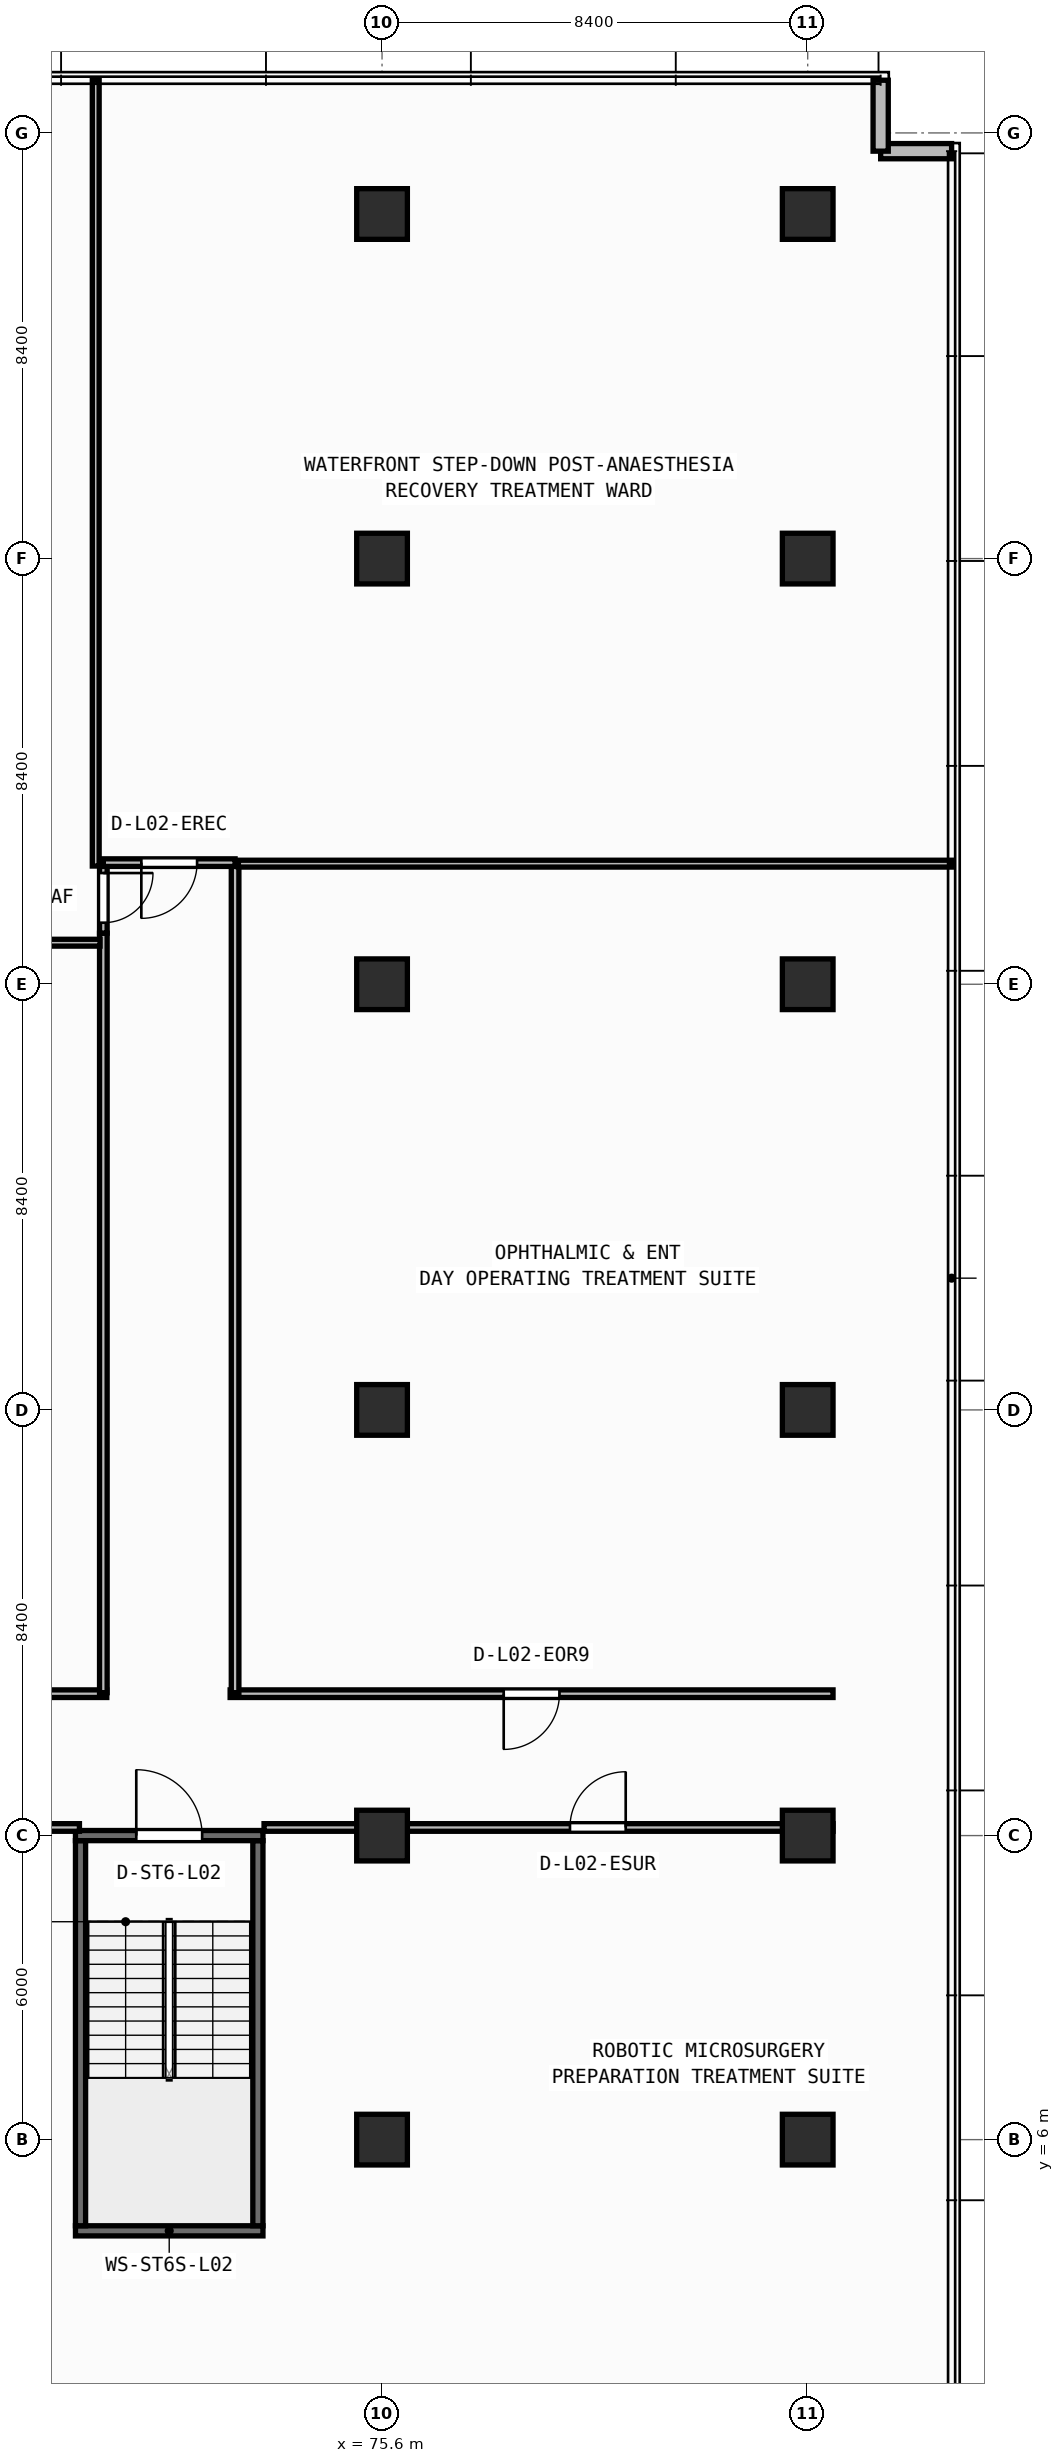
"""IFC4 building model, lengths in metres.
Left out: names, types, materials, properties, quantities, classifications, styles, units other than length and angle.
Written with IfcOpenShell. Run it as: python <this file> out.ifc"""

import sys

from ifc_helpers import new_model, si_unit, direction, frame, frame_2d, origin, origin_2d, place, context, subcontext, project, spatial, rectangle, circle, extrude, element, fill, save


model = new_model("IFC4")
c1 = context("Model", 3, precision=1e-05, world=origin(), true_north=direction((0.0, 1.0)))
c2 = subcontext(c1, "Body", "Model", "MODEL_VIEW")
j1 = project(units=[si_unit("LENGTHUNIT", "METRE"), si_unit("PLANEANGLEUNIT", "RADIAN")], contexts=[c1])
p1 = place(None, origin())
s1 = spatial("IfcSite", under=j1, at=p1, CompositionType="ELEMENT")
p2 = place(p1, origin())
s2 = spatial("IfcBuilding", under=s1, at=p2, CompositionType="ELEMENT")
p3 = place(p2, frame((0.0, 0.0, 9.0)))
s3 = spatial("IfcBuildingStorey", under=s2, at=p3, CompositionType="ELEMENT", Elevation=9.0)
for number, where, z_axis, x_axis in (
    (1, (75.6, 6.0, 0.0), (0.0, 0.0, 1.0), (1.0, 0.0, 0.0)),
    (2, (84.0, 6.0, 0.0), (0.0, 0.0, 1.0), (1.0, 0.0, 0.0)),
    (3, (75.6, 12.0, 0.0), (0.0, 0.0, 1.0), (1.0, 0.0, 0.0)),
    (4, (84.0, 12.0, 0.0), (0.0, 0.0, 1.0), (1.0, 0.0, 0.0)),
    (5, (75.6, 20.4, 0.0), (0.0, 0.0, 1.0), (1.0, 0.0, 0.0)),
    (6, (84.0, 20.4, 0.0), (0.0, 0.0, 1.0), (1.0, 0.0, 0.0)),
    (7, (75.6, 28.8, 0.0), (0.0, 0.0, 1.0), (1.0, 0.0, 0.0)),
    (8, (84.0, 28.8, 0.0), (0.0, 0.0, 1.0), (1.0, 0.0, 0.0)),
    (9, (75.6, 37.2, 0.0), (0.0, 0.0, 1.0), (1.0, 0.0, 0.0)),
    (10, (84.0, 37.2, 0.0), (0.0, 0.0, 1.0), (1.0, 0.0, 0.0)),
    (11, (75.6, 44.0, 0.0), (0.0, 0.0, 1.0), (1.0, 0.0, 0.0)),
    (12, (84.0, 44.0, 0.0), (0.0, 0.0, 1.0), (1.0, 0.0, 0.0)),
):
    element("IfcColumn", number, at=place(p3, frame(where, z_axis=z_axis, x_axis=x_axis)), inside=s3, PredefinedType="COLUMN", context=c2, shape_type="SweptSolid", body=[
        extrude(circle(Radius=0.5, at=origin_2d()), origin(), (0.0, 0.0, 1.0), 4.5),
    ])
p4 = place(p3, frame((86.84, 45.24, 0.0), z_axis=(0.0, 0.0, 1.0), x_axis=(-1.0, 0.0, 0.0)))
e13 = element("IfcWall", 13, at=p4, inside=s3, PredefinedType="STANDARD", context=c2, shape_type="SweptSolid", body=[
    extrude(rectangle(XDim=1.4, YDim=0.3, at=frame_2d((0.7, 0.0))), origin(), (0.0, 0.0, 1.0), 4.25),
])
p5 = place(p3, frame((85.44, 45.24, 0.0), z_axis=(0.0, 0.0, 1.0), x_axis=(0.0, 1.0, 0.0)))
e14 = element("IfcWall", 14, at=p5, inside=s3, PredefinedType="STANDARD", context=c2, shape_type="SweptSolid", body=[
    extrude(rectangle(XDim=1.4, YDim=0.3, at=frame_2d((0.7, 0.0))), origin(), (0.0, 0.0, 1.0), 4.25),
])
p6 = place(p3, frame((69.55, 4.2, 0.0), z_axis=(0.0, 0.0, 1.0), x_axis=(1.0, 0.0, 0.0)))
e15 = element("IfcWall", 15, at=p6, inside=s3, PredefinedType="SHEAR", context=c2, shape_type="SweptSolid", body=[
    extrude(rectangle(XDim=3.7, YDim=0.2, at=frame_2d((1.85, 0.0))), origin(), (0.0, 0.0, 1.0), 4.25),
])
for number, where, z_axis, x_axis in (
    (16, (69.65, 4.3, 0.0), (0.0, 0.0, 1.0), (0.0, 1.0, 0.0)),
    (17, (73.15, 4.3, 0.0), (0.0, 0.0, 1.0), (0.0, 1.0, 0.0)),
):
    element("IfcWall", number, at=place(p3, frame(where, z_axis=z_axis, x_axis=x_axis)), inside=s3, PredefinedType="SHEAR", context=c2, shape_type="SweptSolid", body=[
        extrude(rectangle(XDim=7.6, YDim=0.2, at=frame_2d((3.8, 0.0))), origin(), (0.0, 0.0, 1.0), 4.25),
    ])
p7 = place(p3, frame((69.55, 12.0, 0.0), z_axis=(0.0, 0.0, 1.0), x_axis=(1.0, 0.0, 0.0)))
e18 = element("IfcWall", 18, at=p7, inside=s3, PredefinedType="SHEAR", context=c2, shape_type="SweptSolid", body=[
    extrude(rectangle(XDim=3.7, YDim=0.2, at=frame_2d((1.85, 0.0))), origin(), (0.0, 0.0, 1.0), 4.25),
])
p8 = place(p7, frame((1.2, 0.0, 0.0)))
e19 = element("IfcOpeningElement", 19, at=p8, cuts=e18, PredefinedType="OPENING", context=c2, shape_type="SweptSolid", body=[
    extrude(rectangle(XDim=1.3, YDim=2.15, at=frame_2d((0.65, 1.075))), frame((0.0, 0.11, 0.0), z_axis=(0.0, -1.0, 0.0), x_axis=(1.0, 0.0, 0.0)), (0.0, 0.0, 1.0), 0.22),
])
p9 = place(p3, frame((49.622, 12.16, 0.0), z_axis=(0.0, 0.0, 1.0), x_axis=(1.0, 0.0, 0.0)))
e20 = element("IfcWall", 20, at=p9, inside=s3, PredefinedType="PARTITIONING", context=c2, shape_type="SweptSolid", body=[
    extrude(rectangle(XDim=20.007, YDim=0.15, at=frame_2d((10.003, 0.0))), origin(), (0.0, 0.0, 1.0), 3.425),
])
p10 = place(p9, frame((4.364, 0.0, 0.0)))
e21 = element("IfcOpeningElement", 21, at=p10, cuts=e20, PredefinedType="OPENING", context=c2, shape_type="SweptSolid", body=[
    extrude(rectangle(XDim=1.1, YDim=2.1, at=frame_2d((0.55, 1.05))), frame((0.0, 0.085, 0.0), z_axis=(0.0, -1.0, 0.0), x_axis=(1.0, 0.0, 0.0)), (0.0, 0.0, 1.0), 0.17),
])
p11 = place(p3, frame((73.271, 12.16, 0.0), z_axis=(0.0, 0.0, 1.0), x_axis=(1.0, 0.0, 0.0)))
e22 = element("IfcWall", 22, at=p11, inside=s3, PredefinedType="PARTITIONING", context=c2, shape_type="SweptSolid", body=[
    extrude(rectangle(XDim=11.229, YDim=0.15, at=frame_2d((5.614, 0.0))), origin(), (0.0, 0.0, 1.0), 3.425),
])
p12 = place(p11, frame((6.037, 0.0, 0.0)))
e23 = element("IfcOpeningElement", 23, at=p12, cuts=e22, PredefinedType="OPENING", context=c2, shape_type="SweptSolid", body=[
    extrude(rectangle(XDim=1.1, YDim=2.1, at=frame_2d((0.55, 1.05))), frame((0.0, 0.085, 0.0), z_axis=(0.0, -1.0, 0.0), x_axis=(1.0, 0.0, 0.0)), (0.0, 0.0, 1.0), 0.17),
])
p13 = place(p3, frame((70.168, 14.8, 0.0), z_axis=(0.0, 0.0, 1.0), x_axis=(-1.0, 0.0, 0.0)))
e24 = element("IfcWall", 24, at=p13, inside=s3, PredefinedType="PARTITIONING", context=c2, shape_type="SweptSolid", body=[
    extrude(rectangle(XDim=25.948, YDim=0.15, at=frame_2d((12.974, 0.0))), origin(), (0.0, 0.0, 1.0), 4.25),
])
p14 = place(p13, frame((12.424, 0.0, 0.0)))
e25 = element("IfcOpeningElement", 25, at=p14, cuts=e24, PredefinedType="OPENING", context=c2, shape_type="SweptSolid", body=[
    extrude(rectangle(XDim=1.1, YDim=2.1, at=frame_2d((0.55, 1.05))), frame((0.0, 0.085, 0.0), z_axis=(0.0, -1.0, 0.0), x_axis=(1.0, 0.0, 0.0)), (0.0, 0.0, 1.0), 0.17),
])
p15 = place(p3, frame((84.5, 14.8, 0.0), z_axis=(0.0, 0.0, 1.0), x_axis=(-1.0, 0.0, 0.0)))
e26 = element("IfcWall", 26, at=p15, inside=s3, PredefinedType="PARTITIONING", context=c2, shape_type="SweptSolid", body=[
    extrude(rectangle(XDim=11.898, YDim=0.15, at=frame_2d((5.949, 0.0))), origin(), (0.0, 0.0, 1.0), 4.25),
])
p16 = place(p15, frame((5.399, 0.0, 0.0)))
e27 = element("IfcOpeningElement", 27, at=p16, cuts=e26, PredefinedType="OPENING", context=c2, shape_type="SweptSolid", body=[
    extrude(rectangle(XDim=1.1, YDim=2.1, at=frame_2d((0.55, 1.05))), frame((0.0, 0.085, 0.0), z_axis=(0.0, -1.0, 0.0), x_axis=(1.0, 0.0, 0.0)), (0.0, 0.0, 1.0), 0.17),
])
p17 = place(p3, frame((70.1, 29.807, 0.0), z_axis=(0.0, 0.0, 1.0), x_axis=(0.0, -1.0, 0.0)))
e28 = element("IfcWall", 28, at=p17, inside=s3, PredefinedType="PARTITIONING", context=c2, shape_type="SweptSolid", body=[
    extrude(rectangle(XDim=14.987, YDim=0.15, at=frame_2d((7.494, 0.0))), origin(), (0.0, 0.0, 1.0), 4.25),
])
p18 = place(p3, frame((72.7, 14.82, 0.0), z_axis=(0.0, 0.0, 1.0), x_axis=(0.0, 1.0, 0.0)))
e29 = element("IfcWall", 29, at=p18, inside=s3, PredefinedType="PARTITIONING", context=c2, shape_type="SweptSolid", body=[
    extrude(rectangle(XDim=16.38, YDim=0.15, at=frame_2d((8.19, 0.0))), origin(), (0.0, 0.0, 1.0), 4.25),
])
p19 = place(p3, frame((70.1, 31.2, 0.0), z_axis=(0.0, 0.0, 1.0), x_axis=(0.0, -1.0, 0.0)))
e30 = element("IfcWall", 30, at=p19, inside=s3, PredefinedType="PARTITIONING", context=c2, shape_type="SweptSolid", body=[
    extrude(rectangle(XDim=1.391, YDim=0.15, at=frame_2d((0.695, 0.0))), origin(), (0.0, 0.0, 1.0), 4.25),
])
p20 = place(p19, frame((0.205, 0.0, 0.0)))
e31 = element("IfcOpeningElement", 31, at=p20, cuts=e30, PredefinedType="OPENING", context=c2, shape_type="SweptSolid", body=[
    extrude(rectangle(XDim=0.98, YDim=2.1, at=frame_2d((0.49, 1.05))), frame((0.0, 0.085, 0.0), z_axis=(0.0, -1.0, 0.0), x_axis=(1.0, 0.0, 0.0)), (0.0, 0.0, 1.0), 0.17),
])
p21 = place(p3, frame((72.7, 31.2, 0.0), z_axis=(0.0, 0.0, 1.0), x_axis=(-1.0, 0.0, 0.0)))
e32 = element("IfcWall", 32, at=p21, inside=s3, PredefinedType="PARTITIONING", context=c2, shape_type="SweptSolid", body=[
    extrude(rectangle(XDim=2.6, YDim=0.15, at=frame_2d((1.3, 0.0))), origin(), (0.0, 0.0, 1.0), 4.25),
])
p22 = place(p21, frame((0.75, 0.0, 0.0)))
e33 = element("IfcOpeningElement", 33, at=p22, cuts=e32, PredefinedType="OPENING", context=c2, shape_type="SweptSolid", body=[
    extrude(rectangle(XDim=1.1, YDim=2.1, at=frame_2d((0.55, 1.05))), frame((0.0, 0.085, 0.0), z_axis=(0.0, -1.0, 0.0), x_axis=(1.0, 0.0, 0.0)), (0.0, 0.0, 1.0), 0.17),
])
p23 = place(p3, frame((70.035, 29.62, 0.0), z_axis=(0.0, 0.0, 1.0), x_axis=(-1.0, 0.0, 0.0)))
e34 = element("IfcWall", 34, at=p23, inside=s3, PredefinedType="PARTITIONING", context=c2, shape_type="SweptSolid", body=[
    extrude(rectangle(XDim=25.977, YDim=0.135, at=frame_2d((12.989, 0.0))), origin(), (0.0, 0.0, 1.0), 4.25),
])
p24 = place(p3, frame((86.84, 31.18, 0.0), z_axis=(0.0, 0.0, 1.0), x_axis=(-1.0, 0.0, 0.0)))
e35 = element("IfcWall", 35, at=p24, inside=s3, PredefinedType="PARTITIONING", context=c2, shape_type="SweptSolid", body=[
    extrude(rectangle(XDim=14.075, YDim=0.135, at=frame_2d((7.038, 0.0))), origin(), (0.0, 0.0, 1.0), 4.25),
])
p25 = place(p3, frame((69.95, 31.133, 0.0), z_axis=(0.0, 0.0, 1.0), x_axis=(0.0, 1.0, 0.0)))
e36 = element("IfcWall", 36, at=p25, inside=s3, PredefinedType="PARTITIONING", context=c2, shape_type="SweptSolid", body=[
    extrude(rectangle(XDim=15.507, YDim=0.135, at=frame_2d((7.753, 0.0))), origin(), (0.0, 0.0, 1.0), 4.25),
])
p26 = place(p8, origin())
e37 = element("IfcDoor", 37, at=p26, inside=s3, OperationType="SINGLE_SWING_LEFT", PredefinedType="DOOR", context=c2, shape_type="SweptSolid", body=[
    extrude(rectangle(XDim=1.3, YDim=2.15, at=frame_2d((0.65, 1.075))), frame((0.0, 0.025, 0.0), z_axis=(0.0, -1.0, 0.0), x_axis=(1.0, 0.0, 0.0)), (0.0, 0.0, 1.0), 0.05),
])
fill(e19, e37)
p27 = place(p12, origin())
e38 = element("IfcDoor", 38, at=p27, inside=s3, OperationType="SINGLE_SWING_RIGHT", PredefinedType="DOOR", context=c2, shape_type="SweptSolid", body=[
    extrude(rectangle(XDim=1.1, YDim=2.1, at=frame_2d((0.55, 1.05))), frame((0.0, 0.025, 0.0), z_axis=(0.0, -1.0, 0.0), x_axis=(1.0, 0.0, 0.0)), (0.0, 0.0, 1.0), 0.05),
])
fill(e23, e38)
p28 = place(p16, origin())
e39 = element("IfcDoor", 39, at=p28, inside=s3, OperationType="SINGLE_SWING_RIGHT", PredefinedType="DOOR", context=c2, shape_type="SweptSolid", body=[
    extrude(rectangle(XDim=1.1, YDim=2.1, at=frame_2d((0.55, 1.05))), frame((0.0, 0.025, 0.0), z_axis=(0.0, -1.0, 0.0), x_axis=(1.0, 0.0, 0.0)), (0.0, 0.0, 1.0), 0.05),
])
fill(e27, e39)
p29 = place(p20, origin())
e40 = element("IfcDoor", 40, at=p29, inside=s3, OperationType="SINGLE_SWING_LEFT", PredefinedType="DOOR", context=c2, shape_type="SweptSolid", body=[
    extrude(rectangle(XDim=0.98, YDim=2.1, at=frame_2d((0.49, 1.05))), frame((0.0, 0.025, 0.0), z_axis=(0.0, -1.0, 0.0), x_axis=(1.0, 0.0, 0.0)), (0.0, 0.0, 1.0), 0.05),
])
fill(e31, e40)
p30 = place(p22, origin())
e41 = element("IfcDoor", 41, at=p30, inside=s3, OperationType="SINGLE_SWING_RIGHT", PredefinedType="DOOR", context=c2, shape_type="SweptSolid", body=[
    extrude(rectangle(XDim=1.1, YDim=2.1, at=frame_2d((0.55, 1.05))), frame((0.0, 0.025, 0.0), z_axis=(0.0, -1.0, 0.0), x_axis=(1.0, 0.0, 0.0)), (0.0, 0.0, 1.0), 0.05),
])
fill(e33, e41)
save(model, sys.argv[1])
